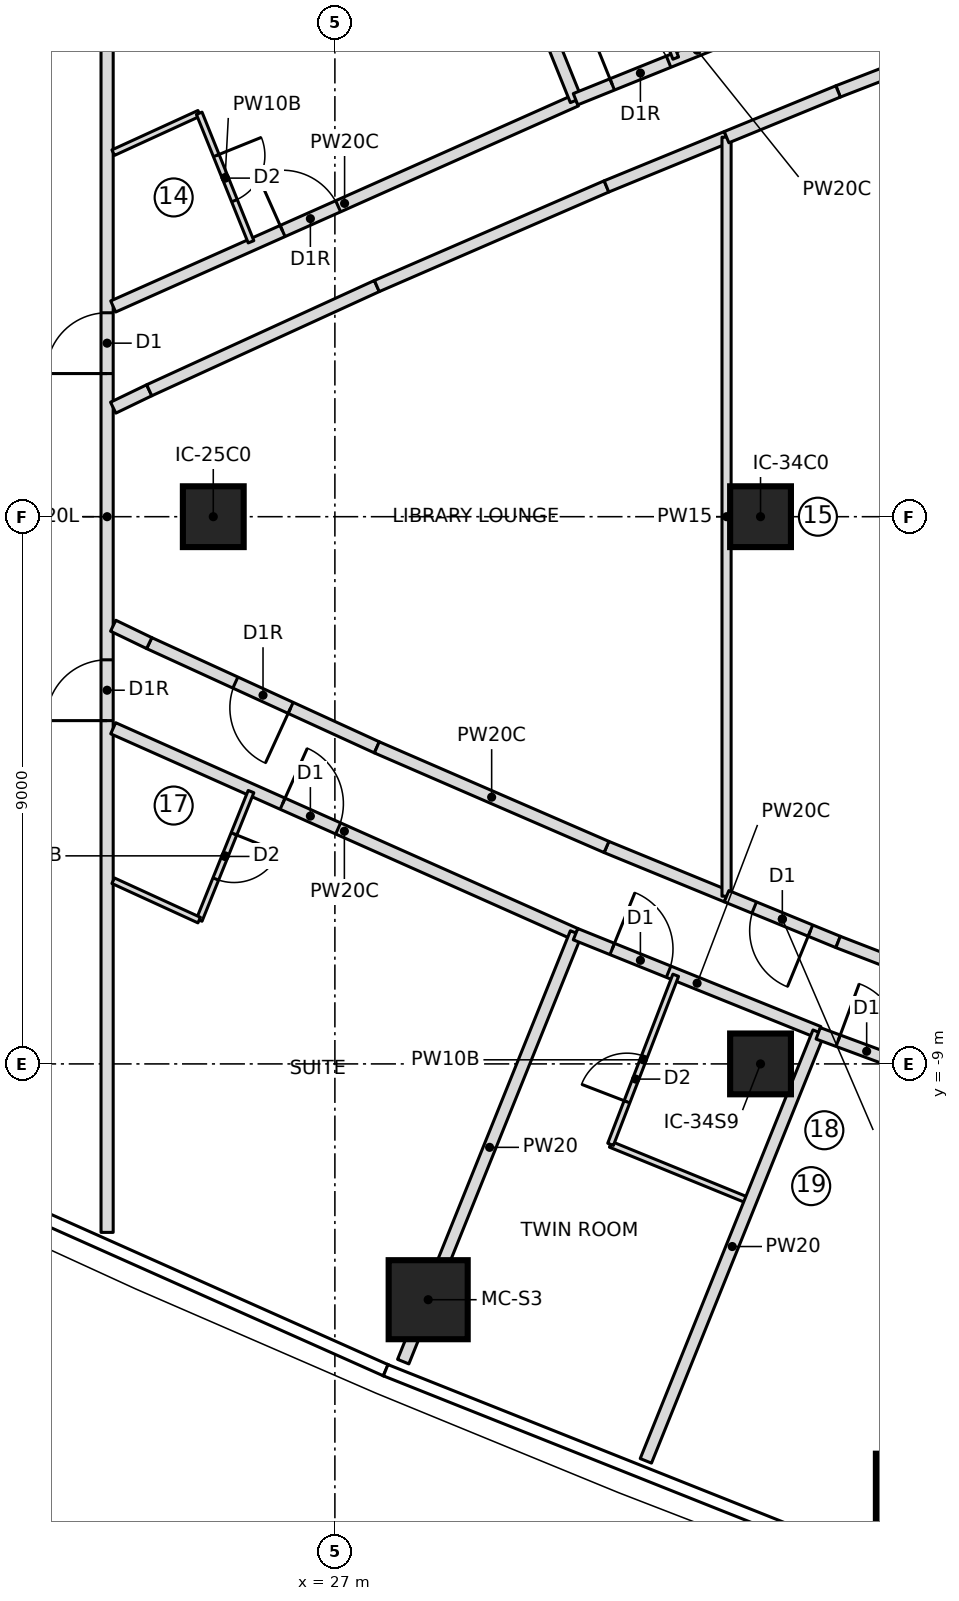
"""IFC4 building model, lengths in metres.
Left out: names, types, materials, properties, quantities, classifications, styles, units other than length and angle.
Written with IfcOpenShell. Run it as: python <this file> out.ifc"""

import sys

from ifc_helpers import new_model, si_unit, direction, frame, frame_2d, origin, origin_2d, place, context, subcontext, project, spatial, rectangle, extrude, element, fill, save


model = new_model("IFC4")
c1 = context("Model", 3, precision=1e-05, world=origin(), true_north=direction((0.0, 1.0)))
c2 = subcontext(c1, "Body", "Model", "MODEL_VIEW")
j1 = project(units=[si_unit("LENGTHUNIT", "METRE"), si_unit("PLANEANGLEUNIT", "RADIAN")], contexts=[c1])
p1 = place(None, origin())
s1 = spatial("IfcSite", under=j1, at=p1, CompositionType="ELEMENT")
p2 = place(p1, origin())
s2 = spatial("IfcBuilding", under=s1, at=p2, CompositionType="ELEMENT")
p3 = place(p2, frame((0.0, 0.0, 207.45)))
s3 = spatial("IfcBuildingStorey", under=s2, at=p3, CompositionType="ELEMENT", Elevation=207.45)
for number, where, z_axis, x_axis in (
    (1, (28.534, -12.878, 0.0), (0.0, 0.0, 1.0), (1.0, 0.0, 0.0)),
    (2, (36.547, -16.061, 0.0), (0.0, 0.0, 1.0), (1.0, 0.0, 0.0)),
):
    element("IfcColumn", number, at=place(p3, frame(where, z_axis=z_axis, x_axis=x_axis)), inside=s3, PredefinedType="COLUMN", context=c2, shape_type="SweptSolid", body=[
        extrude(rectangle(XDim=1.3, YDim=1.3, at=origin_2d()), origin(), (0.0, 0.0, 1.0), 3.55),
    ])
for number, where, z_axis, x_axis in (
    (3, (25.0, 0.0, 0.0), (0.0, 0.0, 1.0), (1.0, 0.0, 0.0)),
    (4, (34.0, -9.0, 0.0), (0.0, 0.0, 1.0), (1.0, 0.0, 0.0)),
    (5, (34.0, 0.0, 0.0), (0.0, 0.0, 1.0), (1.0, 0.0, 0.0)),
):
    element("IfcColumn", number, at=place(p3, frame(where, z_axis=z_axis, x_axis=x_axis)), inside=s3, PredefinedType="COLUMN", context=c2, shape_type="SweptSolid", body=[
        extrude(rectangle(XDim=1.0, YDim=1.0, at=origin_2d()), origin(), (0.0, 0.0, 1.0), 3.55),
    ])
p4 = place(p3, frame((23.254, -11.771, 0.0), z_axis=(0.0, 0.0, 1.0), x_axis=(0.0, 1.0, 0.0)))
e6 = element("IfcWall", 6, at=p4, inside=s3, PredefinedType="PARTITIONING", context=c2, shape_type="SweptSolid", body=[
    extrude(rectangle(XDim=23.542, YDim=0.2, at=frame_2d((11.771, 0.0))), origin(), (0.0, 0.0, 1.0), 3.15),
])
p5 = place(p4, frame((14.125, 0.0, 0.0)))
e7 = element("IfcOpeningElement", 7, at=p5, cuts=e6, PredefinedType="OPENING", context=c2, shape_type="SweptSolid", body=[
    extrude(rectangle(XDim=1.0, YDim=2.1, at=frame_2d((0.5, 1.05))), frame((0.0, 0.11, 0.0), z_axis=(0.0, -1.0, 0.0), x_axis=(1.0, 0.0, 0.0)), (0.0, 0.0, 1.0), 0.22),
])
p6 = place(p4, frame((8.417, 0.0, 0.0)))
e8 = element("IfcOpeningElement", 8, at=p6, cuts=e6, PredefinedType="OPENING", context=c2, shape_type="SweptSolid", body=[
    extrude(rectangle(XDim=1.0, YDim=2.1, at=frame_2d((0.5, 1.05))), frame((0.0, 0.11, 0.0), z_axis=(0.0, -1.0, 0.0), x_axis=(1.0, 0.0, 0.0)), (0.0, 0.0, 1.0), 0.22),
])
p7 = place(p3, frame((23.354, 3.458, 0.0), z_axis=(0.0, 0.0, 1.0), x_axis=(0.913485016927, 0.406872368009, 0.0)))
e9 = element("IfcWall", 9, at=p7, inside=s3, PredefinedType="PARTITIONING", context=c2, shape_type="SweptSolid", body=[
    extrude(rectangle(XDim=8.332, YDim=0.2, at=frame_2d((4.166, 0.0))), origin(), (0.0, 0.0, 1.0), 3.15),
])
p8 = place(p7, frame((3.05, 0.0, 0.0)))
e10 = element("IfcOpeningElement", 10, at=p8, cuts=e9, PredefinedType="OPENING", context=c2, shape_type="SweptSolid", body=[
    extrude(rectangle(XDim=1.0, YDim=2.1, at=frame_2d((0.5, 1.05))), frame((0.0, 0.11, 0.0), z_axis=(0.0, -1.0, 0.0), x_axis=(1.0, 0.0, 0.0)), (0.0, 0.0, 1.0), 0.22),
])
p9 = place(p3, frame((23.354, 5.987, 0.0), z_axis=(0.0, 0.0, 1.0), x_axis=(0.909158902999, 0.416449383597, 0.0)))
e11 = element("IfcWall", 11, at=p9, inside=s3, PredefinedType="PARTITIONING", context=c2, shape_type="SweptSolid", body=[
    extrude(rectangle(XDim=1.556, YDim=0.1, at=frame_2d((0.778, 0.0))), origin(), (0.0, 0.0, 1.0), 3.15),
])
p10 = place(p3, frame((24.769, 6.635, 0.0), z_axis=(0.0, 0.0, 1.0), x_axis=(0.373956446544, -0.927446265877, 0.0)))
e12 = element("IfcWall", 12, at=p10, inside=s3, PredefinedType="PARTITIONING", context=c2, shape_type="SweptSolid", body=[
    extrude(rectangle(XDim=2.279, YDim=0.1, at=frame_2d((1.14, 0.0))), origin(), (0.0, 0.0, 1.0), 3.15),
])
p11 = place(p10, frame((0.75, 0.0, 0.0)))
e13 = element("IfcOpeningElement", 13, at=p11, cuts=e12, PredefinedType="OPENING", context=c2, shape_type="SweptSolid", body=[
    extrude(rectangle(XDim=0.8, YDim=2.1, at=frame_2d((0.4, 1.05))), frame((0.0, 0.06, 0.0), z_axis=(0.0, -1.0, 0.0), x_axis=(1.0, 0.0, 0.0)), (0.0, 0.0, 1.0), 0.12),
])
p12 = place(p3, frame((30.965, 6.848, 0.0), z_axis=(0.0, 0.0, 1.0), x_axis=(-0.373876084216, 0.927478664796, 0.0)))
e14 = element("IfcWall", 14, at=p12, inside=s3, PredefinedType="PARTITIONING", context=c2, shape_type="SweptSolid", body=[
    extrude(rectangle(XDim=7.6, YDim=0.2, at=frame_2d((3.8, 0.0))), origin(), (0.0, 0.0, 1.0), 3.15),
])
p13 = place(p3, frame((30.958, 6.866, 0.0), z_axis=(0.0, 0.0, 1.0), x_axis=(0.927398695046, 0.374074404933, 0.0)))
e15 = element("IfcWall", 15, at=p13, inside=s3, PredefinedType="PARTITIONING", context=c2, shape_type="SweptSolid", body=[
    extrude(rectangle(XDim=4.311, YDim=0.2, at=frame_2d((2.155, 0.0))), origin(), (0.0, 0.0, 1.0), 3.15),
])
p14 = place(p13, frame((0.65, 0.0, 0.0)))
e16 = element("IfcOpeningElement", 16, at=p14, cuts=e15, PredefinedType="OPENING", context=c2, shape_type="SweptSolid", body=[
    extrude(rectangle(XDim=1.0, YDim=2.1, at=frame_2d((0.5, 1.05))), frame((0.0, 0.11, 0.0), z_axis=(0.0, -1.0, 0.0), x_axis=(1.0, 0.0, 0.0)), (0.0, 0.0, 1.0), 0.22),
])
p15 = place(p3, frame((32.605, 7.542, 0.0), z_axis=(0.0, 0.0, 1.0), x_axis=(-0.359637744424, 0.933092006603, 0.0)))
e17 = element("IfcWall", 17, at=p15, inside=s3, PredefinedType="PARTITIONING", context=c2, shape_type="SweptSolid", body=[
    extrude(rectangle(XDim=2.98, YDim=0.1, at=frame_2d((1.49, 0.0))), origin(), (0.0, 0.0, 1.0), 3.15),
])
p16 = place(p15, frame((1.45, 0.0, 0.0)))
e18 = element("IfcOpeningElement", 18, at=p16, cuts=e17, PredefinedType="OPENING", context=c2, shape_type="SweptSolid", body=[
    extrude(rectangle(XDim=0.8, YDim=2.1, at=frame_2d((0.4, 1.05))), frame((0.0, 0.06, 0.0), z_axis=(0.0, -1.0, 0.0), x_axis=(1.0, 0.0, 0.0)), (0.0, 0.0, 1.0), 0.12),
])
p17 = place(p3, frame((23.354, -3.479, 0.0), z_axis=(0.0, 0.0, 1.0), x_axis=(0.913491969365, -0.406856758461, 0.0)))
e19 = element("IfcWall", 19, at=p17, inside=s3, PredefinedType="PARTITIONING", context=c2, shape_type="SweptSolid", body=[
    extrude(rectangle(XDim=8.324, YDim=0.2, at=frame_2d((4.162, 0.0))), origin(), (0.0, 0.0, 1.0), 3.15),
])
p18 = place(p17, frame((3.05, 0.0, 0.0)))
e20 = element("IfcOpeningElement", 20, at=p18, cuts=e19, PredefinedType="OPENING", context=c2, shape_type="SweptSolid", body=[
    extrude(rectangle(XDim=1.0, YDim=2.1, at=frame_2d((0.5, 1.05))), frame((0.0, 0.11, 0.0), z_axis=(0.0, -1.0, 0.0), x_axis=(1.0, 0.0, 0.0)), (0.0, 0.0, 1.0), 0.22),
])
p19 = place(p3, frame((25.621, -4.521, 0.0), z_axis=(0.0, 0.0, 1.0), x_axis=(-0.373956446544, -0.927446265877, 0.0)))
e21 = element("IfcWall", 21, at=p19, inside=s3, PredefinedType="PARTITIONING", context=c2, shape_type="SweptSolid", body=[
    extrude(rectangle(XDim=2.279, YDim=0.1, at=frame_2d((1.14, 0.0))), origin(), (0.0, 0.0, 1.0), 3.15),
])
p20 = place(p19, frame((0.75, 0.0, 0.0)))
e22 = element("IfcOpeningElement", 22, at=p20, cuts=e21, PredefinedType="OPENING", context=c2, shape_type="SweptSolid", body=[
    extrude(rectangle(XDim=0.8, YDim=2.1, at=frame_2d((0.4, 1.05))), frame((0.0, 0.06, 0.0), z_axis=(0.0, -1.0, 0.0), x_axis=(1.0, 0.0, 0.0)), (0.0, 0.0, 1.0), 0.12),
])
p21 = place(p3, frame((24.769, -6.635, 0.0), z_axis=(0.0, 0.0, 1.0), x_axis=(-0.909158902999, 0.416449383597, 0.0)))
e23 = element("IfcWall", 23, at=p21, inside=s3, PredefinedType="PARTITIONING", context=c2, shape_type="SweptSolid", body=[
    extrude(rectangle(XDim=1.556, YDim=0.1, at=frame_2d((0.778, 0.0))), origin(), (0.0, 0.0, 1.0), 3.15),
])
p22 = place(p3, frame((28.124, -13.897, 0.0), z_axis=(0.0, 0.0, 1.0), x_axis=(0.373876084216, 0.927478664796, 0.0)))
e24 = element("IfcWall", 24, at=p22, inside=s3, PredefinedType="PARTITIONING", context=c2, shape_type="SweptSolid", body=[
    extrude(rectangle(XDim=7.6, YDim=0.2, at=frame_2d((3.8, 0.0))), origin(), (0.0, 0.0, 1.0), 3.15),
])
p23 = place(p3, frame((30.958, -6.866, 0.0), z_axis=(0.0, 0.0, 1.0), x_axis=(0.927398695046, -0.374074404933, 0.0)))
e25 = element("IfcWall", 25, at=p23, inside=s3, PredefinedType="PARTITIONING", context=c2, shape_type="SweptSolid", body=[
    extrude(rectangle(XDim=4.311, YDim=0.2, at=frame_2d((2.155, 0.0))), origin(), (0.0, 0.0, 1.0), 3.15),
])
p24 = place(p23, frame((0.65, 0.0, 0.0)))
e26 = element("IfcOpeningElement", 26, at=p24, cuts=e25, PredefinedType="OPENING", context=c2, shape_type="SweptSolid", body=[
    extrude(rectangle(XDim=1.0, YDim=2.1, at=frame_2d((0.5, 1.05))), frame((0.0, 0.11, 0.0), z_axis=(0.0, -1.0, 0.0), x_axis=(1.0, 0.0, 0.0)), (0.0, 0.0, 1.0), 0.22),
])
p25 = place(p3, frame((33.834, -11.261, 0.0), z_axis=(0.0, 0.0, 1.0), x_axis=(-0.925906573805, 0.377752586469, 0.0)))
e27 = element("IfcWall", 27, at=p25, inside=s3, PredefinedType="PARTITIONING", context=c2, shape_type="SweptSolid", body=[
    extrude(rectangle(XDim=2.484, YDim=0.1, at=frame_2d((1.242, 0.0))), origin(), (0.0, 0.0, 1.0), 3.15),
])
p26 = place(p3, frame((31.534, -10.323, 0.0), z_axis=(0.0, 0.0, 1.0), x_axis=(0.359610255373, 0.933102601127, 0.0)))
e28 = element("IfcWall", 28, at=p26, inside=s3, PredefinedType="PARTITIONING", context=c2, shape_type="SweptSolid", body=[
    extrude(rectangle(XDim=2.98, YDim=0.1, at=frame_2d((1.49, 0.0))), origin(), (0.0, 0.0, 1.0), 3.15),
])
p27 = place(p26, frame((0.75, 0.0, 0.0)))
e29 = element("IfcOpeningElement", 29, at=p27, cuts=e28, PredefinedType="OPENING", context=c2, shape_type="SweptSolid", body=[
    extrude(rectangle(XDim=0.8, YDim=2.1, at=frame_2d((0.4, 1.05))), frame((0.0, 0.06, 0.0), z_axis=(0.0, -1.0, 0.0), x_axis=(1.0, 0.0, 0.0)), (0.0, 0.0, 1.0), 0.12),
])
p28 = place(p3, frame((32.114, -15.528, 0.0), z_axis=(0.0, 0.0, 1.0), x_axis=(0.373881438439, 0.927476506436, 0.0)))
e30 = element("IfcWall", 30, at=p28, inside=s3, PredefinedType="PARTITIONING", context=c2, shape_type="SweptSolid", body=[
    extrude(rectangle(XDim=7.601, YDim=0.2, at=frame_2d((3.8, 0.0))), origin(), (0.0, 0.0, 1.0), 3.15),
])
p29 = place(p3, frame((34.948, -8.497, 0.0), z_axis=(0.0, 0.0, 1.0), x_axis=(0.937864515454, -0.347001657996, 0.0)))
e31 = element("IfcWall", 31, at=p29, inside=s3, PredefinedType="PARTITIONING", context=c2, shape_type="SweptSolid", body=[
    extrude(rectangle(XDim=8.621, YDim=0.2, at=frame_2d((4.311, 0.0))), origin(), (0.0, 0.0, 1.0), 3.15),
])
p30 = place(p29, frame((0.35, 0.0, 0.0)))
e32 = element("IfcOpeningElement", 32, at=p30, cuts=e31, PredefinedType="OPENING", context=c2, shape_type="SweptSolid", body=[
    extrude(rectangle(XDim=1.0, YDim=2.1, at=frame_2d((0.5, 1.05))), frame((0.0, 0.11, 0.0), z_axis=(0.0, -1.0, 0.0), x_axis=(1.0, 0.0, 0.0)), (0.0, 0.0, 1.0), 0.22),
])
p31 = place(p3, frame((27.69, -3.793, 0.0), z_axis=(0.0, 0.0, 1.0), x_axis=(-0.909180834404, 0.416401501382, 0.0)))
e33 = element("IfcWall", 33, at=p31, inside=s3, PredefinedType="PARTITIONING", context=c2, shape_type="SweptSolid", body=[
    extrude(rectangle(XDim=4.117, YDim=0.2, at=frame_2d((2.059, 0.0))), origin(), (0.0, 0.0, 1.0), 3.15),
])
p32 = place(p31, frame((1.559, 0.0, 0.0)))
e34 = element("IfcOpeningElement", 34, at=p32, cuts=e33, PredefinedType="OPENING", context=c2, shape_type="SweptSolid", body=[
    extrude(rectangle(XDim=1.0, YDim=2.1, at=frame_2d((0.5, 1.05))), frame((0.0, 0.11, 0.0), z_axis=(0.0, -1.0, 0.0), x_axis=(1.0, 0.0, 0.0)), (0.0, 0.0, 1.0), 0.22),
])
p33 = place(p3, frame((33.441, -6.242, 0.0), z_axis=(0.0, 0.0, 1.0), x_axis=(-0.925231428595, 0.379403220256, 0.0)))
e35 = element("IfcWall", 35, at=p33, inside=s3, PredefinedType="PARTITIONING", context=c2, shape_type="SweptSolid", body=[
    extrude(rectangle(XDim=2.135, YDim=0.2, at=frame_2d((1.067, 0.0))), origin(), (0.0, 0.0, 1.0), 3.15),
])
p34 = place(p3, frame((31.467, -5.432, 0.0), z_axis=(0.0, 0.0, 1.0), x_axis=(-0.917375244839, 0.398023441717, 0.0)))
e36 = element("IfcWall", 36, at=p34, inside=s3, PredefinedType="PARTITIONING", context=c2, shape_type="SweptSolid", body=[
    extrude(rectangle(XDim=4.117, YDim=0.2, at=frame_2d((2.059, 0.0))), origin(), (0.0, 0.0, 1.0), 3.15),
])
for number, where, z_axis, x_axis in (
    (37, (23.947, -2.079, 0.0), (0.0, 0.0, 1.0), (-0.901, 0.435, 0.0)),
    (38, (23.354, 1.793, 0.0), (0.0, 0.0, 1.0), (0.901, 0.435, 0.0)),
):
    element("IfcWall", number, at=place(p3, frame(where, z_axis=z_axis, x_axis=x_axis)), inside=s3, PredefinedType="PARTITIONING", context=c2, shape_type="SweptSolid", body=[
        extrude(rectangle(XDim=0.658, YDim=0.2, at=frame_2d((0.329, 0.0))), origin(), (0.0, 0.0, 1.0), 3.15),
    ])
p35 = place(p3, frame((23.947, 2.079, 0.0), z_axis=(0.0, 0.0, 1.0), x_axis=(0.909180834404, 0.416401501382, 0.0)))
e39 = element("IfcWall", 39, at=p35, inside=s3, PredefinedType="PARTITIONING", context=c2, shape_type="SweptSolid", body=[
    extrude(rectangle(XDim=4.117, YDim=0.2, at=frame_2d((2.059, 0.0))), origin(), (0.0, 0.0, 1.0), 3.15),
])
p36 = place(p3, frame((27.69, 3.793, 0.0), z_axis=(0.0, 0.0, 1.0), x_axis=(0.917375244839, 0.398023441717, 0.0)))
e40 = element("IfcWall", 40, at=p36, inside=s3, PredefinedType="PARTITIONING", context=c2, shape_type="SweptSolid", body=[
    extrude(rectangle(XDim=4.117, YDim=0.2, at=frame_2d((2.059, 0.0))), origin(), (0.0, 0.0, 1.0), 3.15),
])
p37 = place(p3, frame((31.467, 5.432, 0.0), z_axis=(0.0, 0.0, 1.0), x_axis=(0.925231428595, 0.379403220256, 0.0)))
e41 = element("IfcWall", 41, at=p37, inside=s3, PredefinedType="PARTITIONING", context=c2, shape_type="SweptSolid", body=[
    extrude(rectangle(XDim=2.135, YDim=0.2, at=frame_2d((1.067, 0.0))), origin(), (0.0, 0.0, 1.0), 3.15),
])
p38 = place(p3, frame((33.441, -6.242, 0.0), z_axis=(0.0, 0.0, 1.0), x_axis=(0.0, 1.0, 0.0)))
e42 = element("IfcWall", 42, at=p38, inside=s3, PredefinedType="PARTITIONING", context=c2, shape_type="SweptSolid", body=[
    extrude(rectangle(XDim=12.484, YDim=0.15, at=frame_2d((6.242, 0.0))), origin(), (0.0, 0.0, 1.0), 3.15),
])
p39 = place(p3, frame((35.276, -6.994, 0.0), z_axis=(0.0, 0.0, 1.0), x_axis=(-0.925179705777, 0.379529329589, 0.0)))
e43 = element("IfcWall", 43, at=p39, inside=s3, PredefinedType="PARTITIONING", context=c2, shape_type="SweptSolid", body=[
    extrude(rectangle(XDim=1.983, YDim=0.2, at=frame_2d((0.991, 0.0))), origin(), (0.0, 0.0, 1.0), 3.15),
])
p40 = place(p39, frame((0.491, 0.0, 0.0)))
e44 = element("IfcOpeningElement", 44, at=p40, cuts=e43, PredefinedType="OPENING", context=c2, shape_type="SweptSolid", body=[
    extrude(rectangle(XDim=1.0, YDim=2.1, at=frame_2d((0.5, 1.05))), frame((0.0, 0.11, 0.0), z_axis=(0.0, -1.0, 0.0), x_axis=(1.0, 0.0, 0.0)), (0.0, 0.0, 1.0), 0.22),
])
for number, where, z_axis, x_axis in (
    (45, (35.276, 6.994, 0.0), (0.0, 0.0, 1.0), (0.933, 0.361, 0.0)),
    (46, (36.441, -7.445, 0.0), (0.0, 0.0, 1.0), (-0.933, 0.361, 0.0)),
):
    element("IfcWall", number, at=place(p3, frame(where, z_axis=z_axis, x_axis=x_axis)), inside=s3, PredefinedType="PARTITIONING", context=c2, shape_type="SweptSolid", body=[
        extrude(rectangle(XDim=1.25, YDim=0.2, at=frame_2d((0.625, 0.0))), origin(), (0.0, 0.0, 1.0), 3.15),
    ])
p41 = place(p3, frame((33.441, 6.242, 0.0), z_axis=(0.0, 0.0, 1.0), x_axis=(0.925179705777, 0.379529329589, 0.0)))
e47 = element("IfcWall", 47, at=p41, inside=s3, PredefinedType="PARTITIONING", context=c2, shape_type="SweptSolid", body=[
    extrude(rectangle(XDim=1.983, YDim=0.2, at=frame_2d((0.991, 0.0))), origin(), (0.0, 0.0, 1.0), 3.15),
])
p42 = place(p5, origin())
e48 = element("IfcDoor", 48, at=p42, inside=s3, OperationType="SINGLE_SWING_LEFT", PredefinedType="DOOR", context=c2, shape_type="SweptSolid", body=[
    extrude(rectangle(XDim=1.0, YDim=2.1, at=frame_2d((0.5, 1.05))), frame((0.0, 0.025, 0.0), z_axis=(0.0, -1.0, 0.0), x_axis=(1.0, 0.0, 0.0)), (0.0, 0.0, 1.0), 0.05),
])
fill(e7, e48)
p43 = place(p6, origin())
e49 = element("IfcDoor", 49, at=p43, inside=s3, OperationType="SINGLE_SWING_RIGHT", PredefinedType="DOOR", context=c2, shape_type="SweptSolid", body=[
    extrude(rectangle(XDim=1.0, YDim=2.1, at=frame_2d((0.5, 1.05))), frame((0.0, 0.025, 0.0), z_axis=(0.0, -1.0, 0.0), x_axis=(1.0, 0.0, 0.0)), (0.0, 0.0, 1.0), 0.05),
])
fill(e8, e49)
p44 = place(p11, origin())
e50 = element("IfcDoor", 50, at=p44, inside=s3, OperationType="SINGLE_SWING_LEFT", PredefinedType="DOOR", context=c2, shape_type="SweptSolid", body=[
    extrude(rectangle(XDim=0.8, YDim=2.1, at=frame_2d((0.4, 1.05))), frame((0.0, 0.025, 0.0), z_axis=(0.0, -1.0, 0.0), x_axis=(1.0, 0.0, 0.0)), (0.0, 0.0, 1.0), 0.05),
])
fill(e13, e50)
p45 = place(p8, origin())
e51 = element("IfcDoor", 51, at=p45, inside=s3, OperationType="SINGLE_SWING_RIGHT", PredefinedType="DOOR", context=c2, shape_type="SweptSolid", body=[
    extrude(rectangle(XDim=1.0, YDim=2.1, at=frame_2d((0.5, 1.05))), frame((0.0, 0.025, 0.0), z_axis=(0.0, -1.0, 0.0), x_axis=(1.0, 0.0, 0.0)), (0.0, 0.0, 1.0), 0.05),
])
fill(e10, e51)
p46 = place(p14, origin())
e52 = element("IfcDoor", 52, at=p46, inside=s3, OperationType="SINGLE_SWING_RIGHT", PredefinedType="DOOR", context=c2, shape_type="SweptSolid", body=[
    extrude(rectangle(XDim=1.0, YDim=2.1, at=frame_2d((0.5, 1.05))), frame((0.0, 0.025, 0.0), z_axis=(0.0, -1.0, 0.0), x_axis=(1.0, 0.0, 0.0)), (0.0, 0.0, 1.0), 0.05),
])
fill(e16, e52)
p47 = place(p20, origin())
e53 = element("IfcDoor", 53, at=p47, inside=s3, OperationType="SINGLE_SWING_LEFT", PredefinedType="DOOR", context=c2, shape_type="SweptSolid", body=[
    extrude(rectangle(XDim=0.8, YDim=2.1, at=frame_2d((0.4, 1.05))), frame((0.0, 0.025, 0.0), z_axis=(0.0, -1.0, 0.0), x_axis=(1.0, 0.0, 0.0)), (0.0, 0.0, 1.0), 0.05),
])
fill(e22, e53)
p48 = place(p18, origin())
e54 = element("IfcDoor", 54, at=p48, inside=s3, OperationType="SINGLE_SWING_LEFT", PredefinedType="DOOR", context=c2, shape_type="SweptSolid", body=[
    extrude(rectangle(XDim=1.0, YDim=2.1, at=frame_2d((0.5, 1.05))), frame((0.0, 0.025, 0.0), z_axis=(0.0, -1.0, 0.0), x_axis=(1.0, 0.0, 0.0)), (0.0, 0.0, 1.0), 0.05),
])
fill(e20, e54)
p49 = place(p27, origin())
e55 = element("IfcDoor", 55, at=p49, inside=s3, OperationType="SINGLE_SWING_LEFT", PredefinedType="DOOR", context=c2, shape_type="SweptSolid", body=[
    extrude(rectangle(XDim=0.8, YDim=2.1, at=frame_2d((0.4, 1.05))), frame((0.0, 0.025, 0.0), z_axis=(0.0, -1.0, 0.0), x_axis=(1.0, 0.0, 0.0)), (0.0, 0.0, 1.0), 0.05),
])
fill(e29, e55)
p50 = place(p24, origin())
e56 = element("IfcDoor", 56, at=p50, inside=s3, OperationType="SINGLE_SWING_LEFT", PredefinedType="DOOR", context=c2, shape_type="SweptSolid", body=[
    extrude(rectangle(XDim=1.0, YDim=2.1, at=frame_2d((0.5, 1.05))), frame((0.0, 0.025, 0.0), z_axis=(0.0, -1.0, 0.0), x_axis=(1.0, 0.0, 0.0)), (0.0, 0.0, 1.0), 0.05),
])
fill(e26, e56)
p51 = place(p30, origin())
e57 = element("IfcDoor", 57, at=p51, inside=s3, OperationType="SINGLE_SWING_LEFT", PredefinedType="DOOR", context=c2, shape_type="SweptSolid", body=[
    extrude(rectangle(XDim=1.0, YDim=2.1, at=frame_2d((0.5, 1.05))), frame((0.0, 0.025, 0.0), z_axis=(0.0, -1.0, 0.0), x_axis=(1.0, 0.0, 0.0)), (0.0, 0.0, 1.0), 0.05),
])
fill(e32, e57)
p52 = place(p32, origin())
e58 = element("IfcDoor", 58, at=p52, inside=s3, OperationType="SINGLE_SWING_RIGHT", PredefinedType="DOOR", context=c2, shape_type="SweptSolid", body=[
    extrude(rectangle(XDim=1.0, YDim=2.1, at=frame_2d((0.5, 1.05))), frame((0.0, 0.025, 0.0), z_axis=(0.0, -1.0, 0.0), x_axis=(1.0, 0.0, 0.0)), (0.0, 0.0, 1.0), 0.05),
])
fill(e34, e58)
p53 = place(p40, origin())
e59 = element("IfcDoor", 59, at=p53, inside=s3, OperationType="SINGLE_SWING_LEFT", PredefinedType="DOOR", context=c2, shape_type="SweptSolid", body=[
    extrude(rectangle(XDim=1.0, YDim=2.1, at=frame_2d((0.5, 1.05))), frame((0.0, 0.025, 0.0), z_axis=(0.0, -1.0, 0.0), x_axis=(1.0, 0.0, 0.0)), (0.0, 0.0, 1.0), 0.05),
])
fill(e44, e59)
save(model, sys.argv[1])
